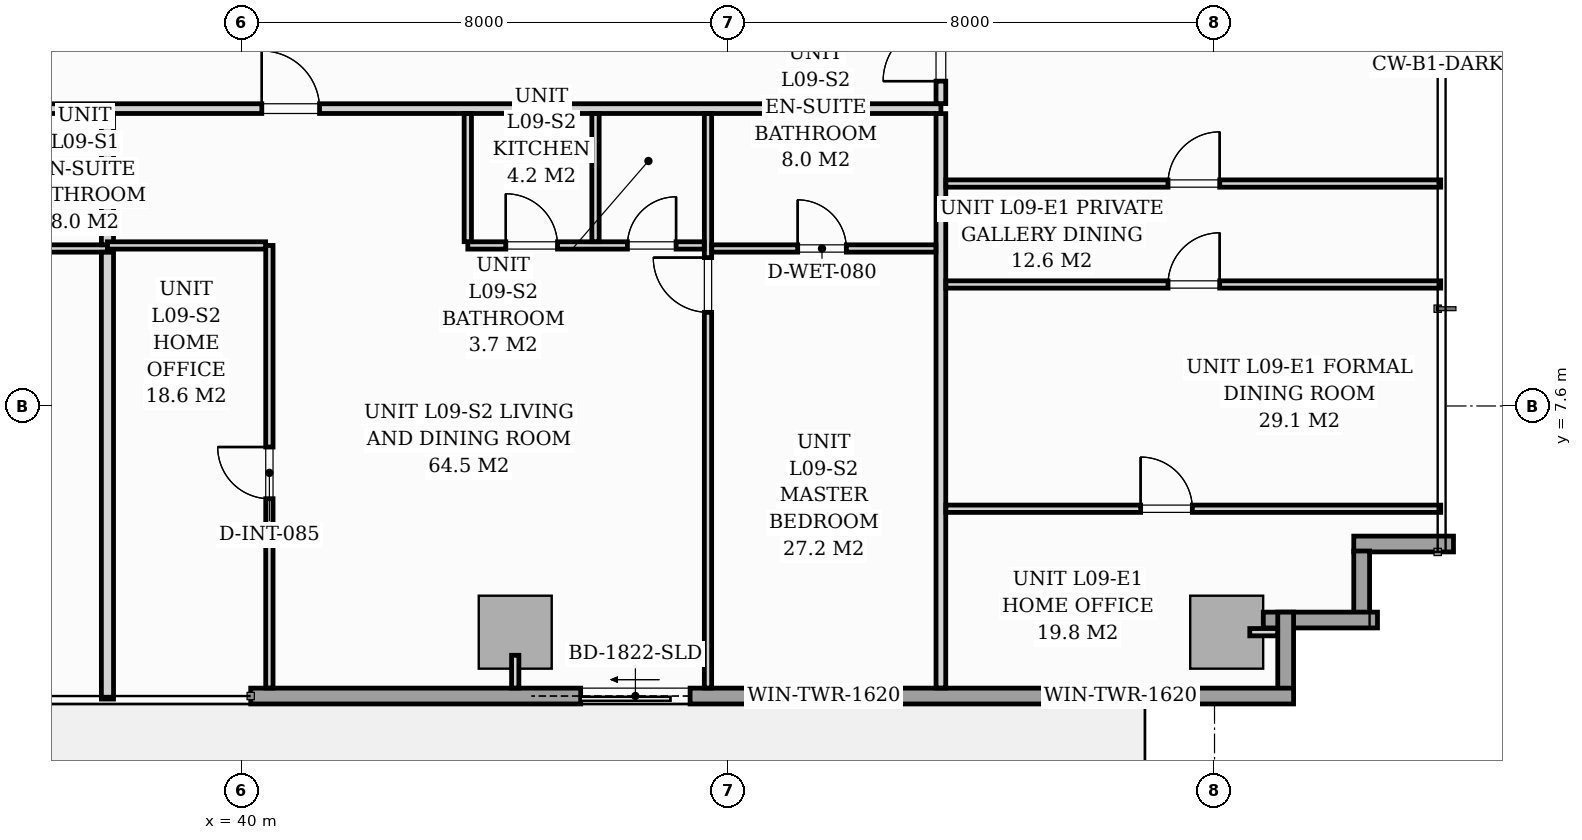
"""IFC4 building model, lengths in metres.
Left out: names, types, materials, properties, quantities, classifications, styles, units other than length and angle.
Written with IfcOpenShell. Run it as: python <this file> out.ifc"""

import sys

from ifc_helpers import new_model, si_unit, direction, frame, frame_2d, origin, origin_2d, place, context, subcontext, project, spatial, rectangle, extrude, source, transform, mapped, element, fill, save


model = new_model("IFC4")
c1 = context("Model", 3, precision=1e-05, world=origin(), true_north=direction((0.0, 1.0)))
c2 = subcontext(c1, "Body", "Model", "MODEL_VIEW")
j1 = project(units=[si_unit("LENGTHUNIT", "METRE"), si_unit("PLANEANGLEUNIT", "RADIAN")], contexts=[c1])
p1 = place(None, origin())
s1 = spatial("IfcSite", under=j1, at=p1, CompositionType="ELEMENT")
p2 = place(p1, origin())
s2 = spatial("IfcBuilding", under=s1, at=p2, CompositionType="ELEMENT")
p3 = place(p2, frame((0.0, 0.0, 35.8)))
s3 = spatial("IfcBuildingStorey", under=s2, at=p3, CompositionType="ELEMENT", Elevation=35.8)
m1 = source(origin(), c2, "Body", "SweptSolid", [
    extrude(rectangle(XDim=1.2, YDim=1.2, at=origin_2d()), origin(), (0.0, 0.0, 1.0), 3.196),
])
for number, where, z_axis, x_axis in (
    (1, (44.5, 3.88, 0.002), (0.0, 0.0, 1.0), (1.0, 0.0, 0.0)),
    (2, (56.2, 3.88, 0.002), (0.0, 0.0, 1.0), (1.0, 0.0, 0.0)),
):
    element("IfcColumn", number, at=place(p3, frame(where, z_axis=z_axis, x_axis=x_axis)), inside=s3, PredefinedType="COLUMN", context=c2, shape_type="MappedRepresentation", body=[
        mapped(m1, transform((0.0, 0.0, 0.0), scale=1.0)),
    ])
p4 = place(p3, frame((59.93, 5.33, 0.0), z_axis=(0.0, 0.0, 1.0), x_axis=(-1.0, 0.0, 0.0)))
e3 = element("IfcWall", 3, at=p4, inside=s3, PredefinedType="STANDARD", context=c2, shape_type="SweptSolid", body=[
    extrude(rectangle(XDim=1.64, YDim=0.26, at=frame_2d((0.82, 0.0))), origin(), (0.0, 0.0, 1.0), 2.94),
])
p5 = place(p3, frame((58.42, 5.215, 0.0), z_axis=(0.0, 0.0, 1.0), x_axis=(0.0, -1.0, 0.0)))
e4 = element("IfcWall", 4, at=p5, inside=s3, PredefinedType="STANDARD", context=c2, shape_type="SweptSolid", body=[
    extrude(rectangle(XDim=1.15, YDim=0.26, at=frame_2d((0.575, 0.0))), origin(), (0.0, 0.0, 1.0), 2.94),
])
p6 = place(p3, frame((58.68, 4.08, 0.0), z_axis=(0.0, 0.0, 1.0), x_axis=(-1.0, 0.0, 0.0)))
e5 = element("IfcWall", 5, at=p6, inside=s3, PredefinedType="STANDARD", context=c2, shape_type="SweptSolid", body=[
    extrude(rectangle(XDim=1.878, YDim=0.26, at=frame_2d((0.939, 0.0))), origin(), (0.0, 0.0, 1.0), 2.94),
])
p7 = place(p3, frame((57.17, 4.21, 0.0), z_axis=(0.0, 0.0, 1.0), x_axis=(0.0, -1.0, 0.0)))
e6 = element("IfcWall", 6, at=p7, inside=s3, PredefinedType="STANDARD", context=c2, shape_type="SweptSolid", body=[
    extrude(rectangle(XDim=1.395, YDim=0.26, at=frame_2d((0.698, 0.0))), origin(), (0.0, 0.0, 1.0), 2.94),
])
p8 = place(p3, frame((57.3, 2.83, 0.0), z_axis=(0.0, 0.0, 1.0), x_axis=(-1.0, 0.0, 0.0)))
e7 = element("IfcWall", 7, at=p8, inside=s3, PredefinedType="STANDARD", context=c2, shape_type="SweptSolid", body=[
    extrude(rectangle(XDim=17.15, YDim=0.26, at=frame_2d((8.575, 0.0))), origin(), (0.0, 0.0, 1.0), 2.94),
])
p9 = place(p8, frame((9.924, 0.0, 0.0)))
e8 = element("IfcOpeningElement", 8, at=p9, cuts=e7, PredefinedType="OPENING", context=c2, shape_type="SweptSolid", body=[
    extrude(rectangle(XDim=1.8, YDim=2.06, at=frame_2d((0.9, 1.03))), frame((0.0, 0.14, 0.0), z_axis=(0.0, -1.0, 0.0), x_axis=(1.0, 0.0, 0.0)), (0.0, 0.0, 1.0), 0.28),
])
p10 = place(p8, frame((2.05, 0.0, 0.65)))
e9 = element("IfcOpeningElement", 9, at=p10, cuts=e7, PredefinedType="OPENING", context=c2, shape_type="SweptSolid", body=[
    extrude(rectangle(XDim=1.6, YDim=1.5, at=frame_2d((0.8, 0.75))), frame((0.0, 0.14, 0.0), z_axis=(0.0, -1.0, 0.0), x_axis=(1.0, 0.0, 0.0)), (0.0, 0.0, 1.0), 0.28),
])
p11 = place(p8, frame((6.925, 0.0, 0.75)))
e10 = element("IfcOpeningElement", 10, at=p11, cuts=e7, PredefinedType="OPENING", context=c2, shape_type="SweptSolid", body=[
    extrude(rectangle(XDim=1.6, YDim=1.5, at=frame_2d((0.8, 0.75))), frame((0.0, 0.14, 0.0), z_axis=(0.0, -1.0, 0.0), x_axis=(1.0, 0.0, 0.0)), (0.0, 0.0, 1.0), 0.28),
])
p12 = place(p3, frame((16.3, 12.49, 0.0), z_axis=(0.0, 0.0, 1.0), x_axis=(1.0, 0.0, 0.0)))
e11 = element("IfcWall", 11, at=p12, inside=s3, PredefinedType="PARTITIONING", context=c2, shape_type="SweptSolid", body=[
    extrude(rectangle(XDim=35.2, YDim=0.16, at=frame_2d((17.6, 0.0))), origin(), (0.0, 0.0, 1.0), 2.94),
])
p13 = place(p12, frame((11.072, 0.0, 0.0)))
e12 = element("IfcOpeningElement", 12, at=p13, cuts=e11, PredefinedType="OPENING", context=c2, shape_type="SweptSolid", body=[
    extrude(rectangle(XDim=0.95, YDim=2.06, at=frame_2d((0.475, 1.03))), frame((0.0, 0.09, 0.0), z_axis=(0.0, -1.0, 0.0), x_axis=(1.0, 0.0, 0.0)), (0.0, 0.0, 1.0), 0.18),
])
p14 = place(p12, frame((24.032, 0.0, 0.0)))
e13 = element("IfcOpeningElement", 13, at=p14, cuts=e11, PredefinedType="OPENING", context=c2, shape_type="SweptSolid", body=[
    extrude(rectangle(XDim=0.95, YDim=2.06, at=frame_2d((0.475, 1.03))), frame((0.0, 0.09, 0.0), z_axis=(0.0, -1.0, 0.0), x_axis=(1.0, 0.0, 0.0)), (0.0, 0.0, 1.0), 0.18),
])
p15 = place(p3, frame((51.5, 2.962, 0.0), z_axis=(0.0, 0.0, 1.0), x_axis=(0.0, 1.0, 0.0)))
e14 = element("IfcWall", 14, at=p15, inside=s3, PredefinedType="PARTITIONING", context=c2, shape_type="SweptSolid", body=[
    extrude(rectangle(XDim=9.446, YDim=0.16, at=frame_2d((4.723, 0.0))), origin(), (0.0, 0.0, 1.0), 2.94),
])
p16 = place(p3, frame((51.5, 12.572, 0.0), z_axis=(0.0, 0.0, 1.0), x_axis=(0.0, 1.0, 0.0)))
e15 = element("IfcWall", 15, at=p16, inside=s3, PredefinedType="PARTITIONING", context=c2, shape_type="SweptSolid", body=[
    extrude(rectangle(XDim=14.866, YDim=0.16, at=frame_2d((7.433, 0.0))), origin(), (0.0, 0.0, 1.0), 2.94),
])
p17 = place(p16, frame((0.37, 0.0, 0.0)))
e16 = element("IfcOpeningElement", 16, at=p17, cuts=e15, PredefinedType="OPENING", context=c2, shape_type="SweptSolid", body=[
    extrude(rectangle(XDim=0.95, YDim=2.06, at=frame_2d((0.475, 1.03))), frame((0.0, 0.09, 0.0), z_axis=(0.0, -1.0, 0.0), x_axis=(1.0, 0.0, 0.0)), (0.0, 0.0, 1.0), 0.18),
])
p18 = place(p3, frame((34.006, 10.19, 0.0), z_axis=(0.0, 0.0, 1.0), x_axis=(1.0, 0.0, 0.0)))
e17 = element("IfcWall", 17, at=p18, inside=s3, PredefinedType="PARTITIONING", context=c2, shape_type="SweptSolid", body=[
    extrude(rectangle(XDim=3.788, YDim=0.12, at=frame_2d((1.894, 0.0))), origin(), (0.0, 0.0, 1.0), 2.94),
])
p19 = place(p18, frame((1.413, 0.0, 0.0)))
e18 = element("IfcOpeningElement", 18, at=p19, cuts=e17, PredefinedType="OPENING", context=c2, shape_type="SweptSolid", body=[
    extrude(rectangle(XDim=0.8, YDim=2.02, at=frame_2d((0.4, 1.01))), frame((0.0, 0.07, 0.0), z_axis=(0.0, -1.0, 0.0), x_axis=(1.0, 0.0, 0.0)), (0.0, 0.0, 1.0), 0.14),
])
p20 = place(p3, frame((37.794, 2.78, 0.0), z_axis=(0.0, 0.0, 1.0), x_axis=(0.0, 1.0, 0.0)))
e19 = element("IfcWall", 19, at=p20, inside=s3, PredefinedType="PARTITIONING", context=c2, shape_type="SweptSolid", body=[
    extrude(rectangle(XDim=7.348, YDim=0.2, at=frame_2d((3.674, 0.0))), origin(), (0.0, 0.0, 1.0), 2.94),
])
p21 = place(p3, frame((37.794, 10.252, 0.0), z_axis=(0.0, 0.0, 1.0), x_axis=(0.0, 1.0, 0.0)))
e20 = element("IfcWall", 20, at=p21, inside=s3, PredefinedType="PARTITIONING", context=c2, shape_type="SweptSolid", body=[
    extrude(rectangle(XDim=2.156, YDim=0.2, at=frame_2d((1.078, 0.0))), origin(), (0.0, 0.0, 1.0), 2.94),
])
p22 = place(p3, frame((47.67, 2.962, 0.0), z_axis=(0.0, 0.0, 1.0), x_axis=(0.0, 1.0, 0.0)))
e21 = element("IfcWall", 21, at=p22, inside=s3, PredefinedType="PARTITIONING", context=c2, shape_type="SweptSolid", body=[
    extrude(rectangle(XDim=9.446, YDim=0.12, at=frame_2d((4.723, 0.0))), origin(), (0.0, 0.0, 1.0), 2.94),
])
p23 = place(p22, frame((6.178, 0.0, 0.0)))
e22 = element("IfcOpeningElement", 22, at=p23, cuts=e21, PredefinedType="OPENING", context=c2, shape_type="SweptSolid", body=[
    extrude(rectangle(XDim=0.9, YDim=2.05, at=frame_2d((0.45, 1.025))), frame((0.0, 0.07, 0.0), z_axis=(0.0, -1.0, 0.0), x_axis=(1.0, 0.0, 0.0)), (0.0, 0.0, 1.0), 0.14),
])
p24 = place(p3, frame((43.72, 10.24, 0.0), z_axis=(0.0, 0.0, 1.0), x_axis=(1.0, 0.0, 0.0)))
e23 = element("IfcWall", 23, at=p24, inside=s3, PredefinedType="PARTITIONING", context=c2, shape_type="SweptSolid", body=[
    extrude(rectangle(XDim=3.888, YDim=0.12, at=frame_2d((1.944, 0.0))), origin(), (0.0, 0.0, 1.0), 2.94),
])
p25 = place(p24, frame((0.625, 0.0, 0.0)))
e24 = element("IfcOpeningElement", 24, at=p25, cuts=e23, PredefinedType="OPENING", context=c2, shape_type="SweptSolid", body=[
    extrude(rectangle(XDim=0.85, YDim=2.05, at=frame_2d((0.425, 1.025))), frame((0.0, 0.07, 0.0), z_axis=(0.0, -1.0, 0.0), x_axis=(1.0, 0.0, 0.0)), (0.0, 0.0, 1.0), 0.14),
])
p26 = place(p24, frame((2.625, 0.0, 0.0)))
e25 = element("IfcOpeningElement", 25, at=p26, cuts=e23, PredefinedType="OPENING", context=c2, shape_type="SweptSolid", body=[
    extrude(rectangle(XDim=0.8, YDim=2.02, at=frame_2d((0.4, 1.01))), frame((0.0, 0.07, 0.0), z_axis=(0.0, -1.0, 0.0), x_axis=(1.0, 0.0, 0.0)), (0.0, 0.0, 1.0), 0.14),
])
for number, where, z_axis, x_axis in (
    (26, (45.82, 10.302, 0.0), (0.0, 0.0, 1.0), (0.0, 1.0, 0.0)),
    (27, (43.72, 10.302, 0.0), (0.0, 0.0, 1.0), (0.0, 1.0, 0.0)),
):
    element("IfcWall", number, at=place(p3, frame(where, z_axis=z_axis, x_axis=x_axis)), inside=s3, PredefinedType="PARTITIONING", context=c2, shape_type="SweptSolid", body=[
        extrude(rectangle(XDim=2.106, YDim=0.12, at=frame_2d((1.053, 0.0))), origin(), (0.0, 0.0, 1.0), 2.94),
    ])
p27 = place(p3, frame((47.732, 10.19, 0.0), z_axis=(0.0, 0.0, 1.0), x_axis=(1.0, 0.0, 0.0)))
e28 = element("IfcWall", 28, at=p27, inside=s3, PredefinedType="PARTITIONING", context=c2, shape_type="SweptSolid", body=[
    extrude(rectangle(XDim=3.686, YDim=0.12, at=frame_2d((1.843, 0.0))), origin(), (0.0, 0.0, 1.0), 2.94),
])
p28 = place(p27, frame((1.413, 0.0, 0.0)))
e29 = element("IfcOpeningElement", 29, at=p28, cuts=e28, PredefinedType="OPENING", context=c2, shape_type="SweptSolid", body=[
    extrude(rectangle(XDim=0.8, YDim=2.02, at=frame_2d((0.4, 1.01))), frame((0.0, 0.07, 0.0), z_axis=(0.0, -1.0, 0.0), x_axis=(1.0, 0.0, 0.0)), (0.0, 0.0, 1.0), 0.14),
])
p29 = place(p3, frame((40.457, 2.962, 0.0), z_axis=(0.0, 0.0, 1.0), x_axis=(0.0, 1.0, 0.0)))
e30 = element("IfcWall", 30, at=p29, inside=s3, PredefinedType="PARTITIONING", context=c2, shape_type="SweptSolid", body=[
    extrude(rectangle(XDim=7.278, YDim=0.12, at=frame_2d((3.639, 0.0))), origin(), (0.0, 0.0, 1.0), 2.94),
])
p30 = place(p29, frame((3.113, 0.0, 0.0)))
e31 = element("IfcOpeningElement", 31, at=p30, cuts=e30, PredefinedType="OPENING", context=c2, shape_type="SweptSolid", body=[
    extrude(rectangle(XDim=0.85, YDim=2.05, at=frame_2d((0.425, 1.025))), frame((0.0, 0.07, 0.0), z_axis=(0.0, -1.0, 0.0), x_axis=(1.0, 0.0, 0.0)), (0.0, 0.0, 1.0), 0.14),
])
p31 = place(p3, frame((37.794, 10.24, 0.0), z_axis=(0.0, 0.0, 1.0), x_axis=(1.0, 0.0, 0.0)))
e32 = element("IfcWall", 32, at=p31, inside=s3, PredefinedType="PARTITIONING", context=c2, shape_type="SweptSolid", body=[
    extrude(rectangle(XDim=2.601, YDim=0.12, at=frame_2d((1.301, 0.0))), origin(), (0.0, 0.0, 1.0), 2.94),
])
p32 = place(p3, frame((51.582, 5.91, 0.0), z_axis=(0.0, 0.0, 1.0), x_axis=(1.0, 0.0, 0.0)))
e33 = element("IfcWall", 33, at=p32, inside=s3, PredefinedType="PARTITIONING", context=c2, shape_type="SweptSolid", body=[
    extrude(rectangle(XDim=8.138, YDim=0.12, at=frame_2d((4.069, 0.0))), origin(), (0.0, 0.0, 1.0), 2.94),
])
p33 = place(p32, frame((3.203, 0.0, 0.0)))
e34 = element("IfcOpeningElement", 34, at=p33, cuts=e33, PredefinedType="OPENING", context=c2, shape_type="SweptSolid", body=[
    extrude(rectangle(XDim=0.85, YDim=2.05, at=frame_2d((0.425, 1.025))), frame((0.0, 0.07, 0.0), z_axis=(0.0, -1.0, 0.0), x_axis=(1.0, 0.0, 0.0)), (0.0, 0.0, 1.0), 0.14),
])
p34 = place(p3, frame((51.582, 9.598, 0.0), z_axis=(0.0, 0.0, 1.0), x_axis=(1.0, 0.0, 0.0)))
e35 = element("IfcWall", 35, at=p34, inside=s3, PredefinedType="PARTITIONING", context=c2, shape_type="SweptSolid", body=[
    extrude(rectangle(XDim=8.138, YDim=0.12, at=frame_2d((4.069, 0.0))), origin(), (0.0, 0.0, 1.0), 2.94),
])
p35 = place(p34, frame((3.653, 0.0, 0.0)))
e36 = element("IfcOpeningElement", 36, at=p35, cuts=e35, PredefinedType="OPENING", context=c2, shape_type="SweptSolid", body=[
    extrude(rectangle(XDim=0.85, YDim=2.05, at=frame_2d((0.425, 1.025))), frame((0.0, 0.07, 0.0), z_axis=(0.0, -1.0, 0.0), x_axis=(1.0, 0.0, 0.0)), (0.0, 0.0, 1.0), 0.14),
])
p36 = place(p3, frame((51.582, 11.258, 0.0), z_axis=(0.0, 0.0, 1.0), x_axis=(1.0, 0.0, 0.0)))
e37 = element("IfcWall", 37, at=p36, inside=s3, PredefinedType="PARTITIONING", context=c2, shape_type="SweptSolid", body=[
    extrude(rectangle(XDim=8.138, YDim=0.12, at=frame_2d((4.069, 0.0))), origin(), (0.0, 0.0, 1.0), 2.94),
])
p37 = place(p36, frame((3.653, 0.0, 0.0)))
e38 = element("IfcOpeningElement", 38, at=p37, cuts=e37, PredefinedType="OPENING", context=c2, shape_type="SweptSolid", body=[
    extrude(rectangle(XDim=0.85, YDim=2.05, at=frame_2d((0.425, 1.025))), frame((0.0, 0.07, 0.0), z_axis=(0.0, -1.0, 0.0), x_axis=(1.0, 0.0, 0.0)), (0.0, 0.0, 1.0), 0.14),
])
p38 = place(p3, frame((44.5, 3.5, 0.0), z_axis=(0.0, 0.0, 1.0), x_axis=(0.0, -1.0, 0.0)))
e39 = element("IfcWall", 39, at=p38, inside=s3, PredefinedType="PARTITIONING", context=c2, shape_type="SweptSolid", body=[
    extrude(rectangle(XDim=0.538, YDim=0.12, at=frame_2d((0.269, 0.0))), origin(), (0.0, 0.0, 1.0), 2.94),
])
p39 = place(p3, frame((56.58, 3.88, 0.0), z_axis=(0.0, 0.0, 1.0), x_axis=(1.0, 0.0, 0.0)))
e40 = element("IfcWall", 40, at=p39, inside=s3, PredefinedType="PARTITIONING", context=c2, shape_type="SweptSolid", body=[
    extrude(rectangle(XDim=0.458, YDim=0.12, at=frame_2d((0.229, 0.0))), origin(), (0.0, 0.0, 1.0), 2.94),
])
m2 = source(origin(), c2, "Body", "SweptSolid", [
    extrude(rectangle(XDim=1.8, YDim=2.06, at=frame_2d((0.9, 1.03))), frame((0.0, 0.025, 0.0), z_axis=(0.0, -1.0, 0.0), x_axis=(1.0, 0.0, 0.0)), (0.0, 0.0, 1.0), 0.05),
])
p40 = place(p9, origin())
e41 = element("IfcDoor", 41, at=p40, inside=s3, OperationType="SLIDING_TO_RIGHT", PredefinedType="DOOR", context=c2, shape_type="MappedRepresentation", body=[
    mapped(m2, transform((0.0, 0.0, 0.0), scale=1.0)),
])
fill(e8, e41)
m3 = source(origin(), c2, "Body", "SweptSolid", [
    extrude(rectangle(XDim=1.6, YDim=1.5, at=frame_2d((0.8, 0.75))), frame((0.0, 0.03, 0.0), z_axis=(0.0, -1.0, 0.0), x_axis=(1.0, 0.0, 0.0)), (0.0, 0.0, 1.0), 0.06),
])
p41 = place(p10, origin())
e42 = element("IfcWindow", 42, at=p41, inside=s3, PartitioningType="SINGLE_PANEL", PredefinedType="WINDOW", context=c2, shape_type="MappedRepresentation", body=[
    mapped(m3, transform((0.0, 0.0, 0.0), scale=1.0)),
])
fill(e9, e42)
p42 = place(p11, origin())
e43 = element("IfcWindow", 43, at=p42, inside=s3, PartitioningType="SINGLE_PANEL", PredefinedType="WINDOW", context=c2, shape_type="MappedRepresentation", body=[
    mapped(m3, transform((0.0, 0.0, 0.0), scale=1.0)),
])
fill(e10, e43)
m4 = source(origin(), c2, "Body", "SweptSolid", [
    extrude(rectangle(XDim=0.8, YDim=2.02, at=frame_2d((0.4, 1.01))), frame((0.0, 0.025, 0.0), z_axis=(0.0, -1.0, 0.0), x_axis=(1.0, 0.0, 0.0)), (0.0, 0.0, 1.0), 0.05),
])
p43 = place(p28, origin())
e44 = element("IfcDoor", 44, at=p43, inside=s3, OperationType="SINGLE_SWING_LEFT", PredefinedType="DOOR", context=c2, shape_type="MappedRepresentation", body=[
    mapped(m4, transform((0.0, 0.0, 0.0), scale=1.0)),
])
fill(e29, e44)
m5 = source(origin(), c2, "Body", "SweptSolid", [
    extrude(rectangle(XDim=0.85, YDim=2.05, at=frame_2d((0.425, 1.025))), frame((0.0, 0.025, 0.0), z_axis=(0.0, -1.0, 0.0), x_axis=(1.0, 0.0, 0.0)), (0.0, 0.0, 1.0), 0.05),
])
p44 = place(p30, origin())
e45 = element("IfcDoor", 45, at=p44, inside=s3, OperationType="SINGLE_SWING_RIGHT", PredefinedType="DOOR", context=c2, shape_type="MappedRepresentation", body=[
    mapped(m5, transform((0.0, 0.0, 0.0), scale=1.0)),
])
fill(e31, e45)
m6 = source(origin(), c2, "Body", "SweptSolid", [
    extrude(rectangle(XDim=0.95, YDim=2.06, at=frame_2d((0.475, 1.03))), frame((0.0, 0.025, 0.0), z_axis=(0.0, -1.0, 0.0), x_axis=(1.0, 0.0, 0.0)), (0.0, 0.0, 1.0), 0.05),
])
p45 = place(p14, origin())
e46 = element("IfcDoor", 46, at=p45, inside=s3, OperationType="SINGLE_SWING_LEFT", PredefinedType="DOOR", context=c2, shape_type="MappedRepresentation", body=[
    mapped(m6, transform((0.0, 0.0, 0.0), scale=1.0)),
])
fill(e13, e46)
m7 = source(origin(), c2, "Body", "SweptSolid", [
    extrude(rectangle(XDim=0.9, YDim=2.05, at=frame_2d((0.45, 1.025))), frame((0.0, 0.025, 0.0), z_axis=(0.0, -1.0, 0.0), x_axis=(1.0, 0.0, 0.0)), (0.0, 0.0, 1.0), 0.05),
])
p46 = place(p23, origin())
e47 = element("IfcDoor", 47, at=p46, inside=s3, OperationType="SINGLE_SWING_RIGHT", PredefinedType="DOOR", context=c2, shape_type="MappedRepresentation", body=[
    mapped(m7, transform((0.0, 0.0, 0.0), scale=1.0)),
])
fill(e22, e47)
p47 = place(p25, origin())
e48 = element("IfcDoor", 48, at=p47, inside=s3, OperationType="SINGLE_SWING_LEFT", PredefinedType="DOOR", context=c2, shape_type="MappedRepresentation", body=[
    mapped(m5, transform((0.0, 0.0, 0.0), scale=1.0)),
])
fill(e24, e48)
p48 = place(p26, origin())
e49 = element("IfcDoor", 49, at=p48, inside=s3, OperationType="SINGLE_SWING_RIGHT", PredefinedType="DOOR", context=c2, shape_type="MappedRepresentation", body=[
    mapped(m4, transform((0.0, 0.0, 0.0), scale=1.0)),
])
fill(e25, e49)
p49 = place(p17, origin())
e50 = element("IfcDoor", 50, at=p49, inside=s3, OperationType="SINGLE_SWING_LEFT", PredefinedType="DOOR", context=c2, shape_type="MappedRepresentation", body=[
    mapped(m6, transform((0.0, 0.0, 0.0), scale=1.0)),
])
fill(e16, e50)
p50 = place(p33, origin())
e51 = element("IfcDoor", 51, at=p50, inside=s3, OperationType="SINGLE_SWING_LEFT", PredefinedType="DOOR", context=c2, shape_type="MappedRepresentation", body=[
    mapped(m5, transform((0.0, 0.0, 0.0), scale=1.0)),
])
fill(e34, e51)
p51 = place(p35, origin())
e52 = element("IfcDoor", 52, at=p51, inside=s3, OperationType="SINGLE_SWING_RIGHT", PredefinedType="DOOR", context=c2, shape_type="MappedRepresentation", body=[
    mapped(m5, transform((0.0, 0.0, 0.0), scale=1.0)),
])
fill(e36, e52)
p52 = place(p37, origin())
e53 = element("IfcDoor", 53, at=p52, inside=s3, OperationType="SINGLE_SWING_RIGHT", PredefinedType="DOOR", context=c2, shape_type="MappedRepresentation", body=[
    mapped(m5, transform((0.0, 0.0, 0.0), scale=1.0)),
])
fill(e38, e53)
save(model, sys.argv[1])
